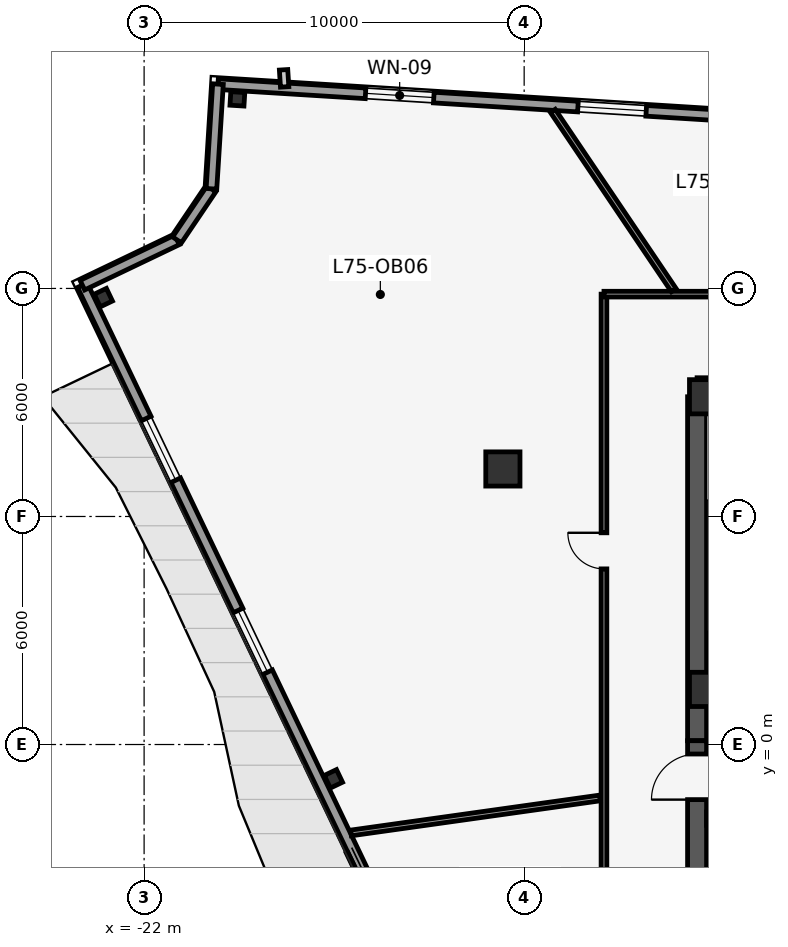
"""IFC4 building model, lengths in metres.
Left out: names, types, materials, properties, quantities, classifications, styles, units other than length and angle.
Written with IfcOpenShell. Run it as: python <this file> out.ifc"""

import sys

from ifc_helpers import new_model, si_unit, direction, frame, frame_2d, origin, origin_2d, place, context, subcontext, project, spatial, rectangle, i_section, extrude, element, fill, save


model = new_model("IFC4")
c1 = context("Model", 3, precision=1e-05, world=origin(), true_north=direction((0.0, 1.0)))
c2 = subcontext(c1, "Body", "Model", "MODEL_VIEW")
j1 = project(units=[si_unit("LENGTHUNIT", "METRE"), si_unit("PLANEANGLEUNIT", "RADIAN")], contexts=[c1])
p1 = place(None, origin())
s1 = spatial("IfcSite", under=j1, at=p1, CompositionType="ELEMENT")
p2 = place(p1, origin())
s2 = spatial("IfcBuilding", under=s1, at=p2, CompositionType="ELEMENT")
p3 = place(p2, frame((0.0, 0.0, 318.8)))
s3 = spatial("IfcBuildingStorey", under=s2, at=p3, CompositionType="ELEMENT", Elevation=318.8)
p4 = place(p3, frame((-7.45, 9.4, 0.0), z_axis=(0.0, 0.0, 1.0), x_axis=(1.0, 0.0, 0.0)))
e1 = element("IfcWall", 1, at=p4, inside=s3, PredefinedType="SHEAR", context=c2, shape_type="SweptSolid", body=[
    extrude(rectangle(XDim=14.9, YDim=0.5, at=frame_2d((7.45, 0.0))), origin(), (0.0, 0.0, 1.0), 4.32),
])
p5 = place(p4, frame((6.9, 0.0, 0.0)))
e2 = element("IfcOpeningElement", 2, at=p5, cuts=e1, PredefinedType="OPENING", context=c2, shape_type="SweptSolid", body=[
    extrude(rectangle(XDim=1.1, YDim=2.15, at=frame_2d((0.55, 1.075))), frame((0.0, 0.26, 0.0), z_axis=(0.0, -1.0, 0.0), x_axis=(1.0, 0.0, 0.0)), (0.0, 0.0, 1.0), 0.52),
])
p6 = place(p4, frame((4.23, 0.0, 0.0)))
e3 = element("IfcOpeningElement", 3, at=p6, cuts=e1, PredefinedType="OPENING", context=c2, shape_type="SweptSolid", body=[
    extrude(rectangle(XDim=0.88, YDim=2.15, at=frame_2d((0.44, 1.075))), frame((0.0, 0.26, 0.0), z_axis=(0.0, -1.0, 0.0), x_axis=(1.0, 0.0, 0.0)), (0.0, 0.0, 1.0), 0.52),
])
p7 = place(p4, frame((9.79, 0.0, 0.0)))
e4 = element("IfcOpeningElement", 4, at=p7, cuts=e1, PredefinedType="OPENING", context=c2, shape_type="SweptSolid", body=[
    extrude(rectangle(XDim=0.88, YDim=2.15, at=frame_2d((0.44, 1.075))), frame((0.0, 0.26, 0.0), z_axis=(0.0, -1.0, 0.0), x_axis=(1.0, 0.0, 0.0)), (0.0, 0.0, 1.0), 0.52),
])
p8 = place(p3, frame((-7.2, 1.275, 0.0), z_axis=(0.0, 0.0, 1.0), x_axis=(1.0, 0.0, 0.0)))
e5 = element("IfcWall", 5, at=p8, inside=s3, PredefinedType="SHEAR", context=c2, shape_type="SweptSolid", body=[
    extrude(rectangle(XDim=14.4, YDim=0.35, at=frame_2d((7.2, 0.0))), origin(), (0.0, 0.0, 1.0), 4.32),
])
p9 = place(p8, frame((3.795, 0.0, 0.0)))
e6 = element("IfcOpeningElement", 6, at=p9, cuts=e5, PredefinedType="OPENING", context=c2, shape_type="SweptSolid", body=[
    extrude(rectangle(XDim=1.25, YDim=2.25, at=frame_2d((0.625, 1.125))), frame((0.0, 0.185, 0.0), z_axis=(0.0, -1.0, 0.0), x_axis=(1.0, 0.0, 0.0)), (0.0, 0.0, 1.0), 0.37),
])
p10 = place(p8, frame((9.355, 0.0, 0.0)))
e7 = element("IfcOpeningElement", 7, at=p10, cuts=e5, PredefinedType="OPENING", context=c2, shape_type="SweptSolid", body=[
    extrude(rectangle(XDim=1.25, YDim=2.25, at=frame_2d((0.625, 1.125))), frame((0.0, 0.185, 0.0), z_axis=(0.0, -1.0, 0.0), x_axis=(1.0, 0.0, 0.0)), (0.0, 0.0, 1.0), 0.37),
])
p11 = place(p8, frame((1.075, 0.0, 0.0)))
e8 = element("IfcOpeningElement", 8, at=p11, cuts=e5, PredefinedType="OPENING", context=c2, shape_type="SweptSolid", body=[
    extrude(rectangle(XDim=1.1, YDim=2.15, at=frame_2d((0.55, 1.075))), frame((0.0, 0.185, 0.0), z_axis=(0.0, -1.0, 0.0), x_axis=(1.0, 0.0, 0.0)), (0.0, 0.0, 1.0), 0.37),
])
p12 = place(p8, frame((12.225, 0.0, 0.0)))
e9 = element("IfcOpeningElement", 9, at=p12, cuts=e5, PredefinedType="OPENING", context=c2, shape_type="SweptSolid", body=[
    extrude(rectangle(XDim=1.1, YDim=2.15, at=frame_2d((0.55, 1.075))), frame((0.0, 0.185, 0.0), z_axis=(0.0, -1.0, 0.0), x_axis=(1.0, 0.0, 0.0)), (0.0, 0.0, 1.0), 0.37),
])
p13 = place(p3, frame((-7.45, 0.1, 0.0), z_axis=(0.0, 0.0, 1.0), x_axis=(0.0, 1.0, 0.0)))
e10 = element("IfcWall", 10, at=p13, inside=s3, PredefinedType="SHEAR", context=c2, shape_type="SweptSolid", body=[
    extrude(rectangle(XDim=9.05, YDim=0.5, at=frame_2d((4.525, 0.0))), origin(), (0.0, 0.0, 1.0), 4.32),
])
p14 = place(p3, frame((-7.45, -9.0, 0.0), z_axis=(0.0, 0.0, 1.0), x_axis=(0.0, 1.0, 0.0)))
e11 = element("IfcWall", 11, at=p14, inside=s3, PredefinedType="SHEAR", context=c2, shape_type="SweptSolid", body=[
    extrude(rectangle(XDim=9.1, YDim=0.5, at=frame_2d((4.55, 0.0))), origin(), (0.0, 0.0, 1.0), 4.32),
])
p15 = place(p14, frame((2.64, 0.0, 0.0)))
e12 = element("IfcOpeningElement", 12, at=p15, cuts=e11, PredefinedType="OPENING", context=c2, shape_type="SweptSolid", body=[
    extrude(rectangle(XDim=1.8, YDim=2.2, at=frame_2d((0.9, 1.1))), frame((0.0, 0.26, 0.0), z_axis=(0.0, -1.0, 0.0), x_axis=(1.0, 0.0, 0.0)), (0.0, 0.0, 1.0), 0.52),
])
p16 = place(p14, frame((7.55, 0.0, 0.0)))
e13 = element("IfcOpeningElement", 13, at=p16, cuts=e11, PredefinedType="OPENING", context=c2, shape_type="SweptSolid", body=[
    extrude(rectangle(XDim=1.2, YDim=2.15, at=frame_2d((0.6, 1.075))), frame((0.0, 0.26, 0.0), z_axis=(0.0, -1.0, 0.0), x_axis=(1.0, 0.0, 0.0)), (0.0, 0.0, 1.0), 0.52),
])
p17 = place(p3, frame((-7.2, -1.95, 0.0), z_axis=(0.0, 0.0, 1.0), x_axis=(1.0, 0.0, 0.0)))
e14 = element("IfcWall", 14, at=p17, inside=s3, PredefinedType="SHEAR", context=c2, shape_type="SweptSolid", body=[
    extrude(rectangle(XDim=14.4, YDim=0.35, at=frame_2d((7.2, 0.0))), origin(), (0.0, 0.0, 1.0), 4.32),
])
for number, where, z_axis, x_axis in (
    (15, (-7.2, 9.15, 0.0), (0.0, 0.0, 1.0), (1.0, 0.0, 0.0)),
    (16, (-7.2, 1.45, 0.0), (0.0, 0.0, 1.0), (1.0, 0.0, 0.0)),
    (17, (-12.56, 7.25, 0.0), (0.0, 0.0, 1.0), (1.0, 0.0, 0.0)),
):
    element("IfcColumn", number, at=place(p3, frame(where, z_axis=z_axis, x_axis=x_axis)), inside=s3, PredefinedType="COLUMN", context=c2, shape_type="SweptSolid", body=[
        extrude(rectangle(XDim=0.9, YDim=0.9, at=origin_2d()), origin(), (0.0, 0.0, 1.0), 4.6),
    ])
for number, where, z_axis, x_axis in (
    (18, (-23.073, 11.759, 0.0), (0.0, 0.0, 1.0), (-0.431, 0.902, 0.0)),
    (19, (-17.019, -0.903, 0.0), (0.0, 0.0, 1.0), (-0.431, 0.902, 0.0)),
    (20, (-19.546, 16.988, 0.0), (0.0, 0.0, 1.0), (-0.998, 0.062, 0.0)),
):
    element("IfcColumn", number, at=place(p3, frame(where, z_axis=z_axis, x_axis=x_axis)), inside=s3, PredefinedType="COLUMN", context=c2, shape_type="SweptSolid", body=[
        extrude(i_section(OverallWidth=0.368, OverallDepth=0.356, WebThickness=0.011, FlangeThickness=0.018, at=origin_2d()), origin(), (0.0, 0.0, 1.0), 4.6),
    ])
p18 = place(p3, frame((-20.056, 17.376, 0.0), z_axis=(0.0, 0.0, 1.0), x_axis=(0.998061236898, -0.06223959674, 0.0)))
e21 = element("IfcWall", 21, at=p18, inside=s3, PredefinedType="STANDARD", context=c2, shape_type="SweptSolid", body=[
    extrude(rectangle(XDim=43.18, YDim=0.28, at=frame_2d((21.59, 0.0))), origin(), (0.0, 0.0, 1.0), 4.32),
])
p19 = place(p18, frame((3.89, 0.0, 0.85)))
e22 = element("IfcOpeningElement", 22, at=p19, cuts=e21, PredefinedType="OPENING", context=c2, shape_type="SweptSolid", body=[
    extrude(rectangle(XDim=1.8, YDim=2.4, at=frame_2d((0.9, 1.2))), frame((0.0, 0.15, 0.0), z_axis=(0.0, -1.0, 0.0), x_axis=(1.0, 0.0, 0.0)), (0.0, 0.0, 1.0), 0.3),
])
p20 = place(p18, frame((9.49, 0.0, 0.85)))
e23 = element("IfcOpeningElement", 23, at=p20, cuts=e21, PredefinedType="OPENING", context=c2, shape_type="SweptSolid", body=[
    extrude(rectangle(XDim=1.8, YDim=2.4, at=frame_2d((0.9, 1.2))), frame((0.0, 0.15, 0.0), z_axis=(0.0, -1.0, 0.0), x_axis=(1.0, 0.0, 0.0)), (0.0, 0.0, 1.0), 0.3),
])
p21 = place(p18, frame((31.89, 0.0, 0.85)))
e24 = element("IfcOpeningElement", 24, at=p21, cuts=e21, PredefinedType="OPENING", context=c2, shape_type="SweptSolid", body=[
    extrude(rectangle(XDim=1.8, YDim=2.4, at=frame_2d((0.9, 1.2))), frame((0.0, 0.15, 0.0), z_axis=(0.0, -1.0, 0.0), x_axis=(1.0, 0.0, 0.0)), (0.0, 0.0, 1.0), 0.3),
])
p22 = place(p18, frame((37.49, 0.0, 0.85)))
e25 = element("IfcOpeningElement", 25, at=p22, cuts=e21, PredefinedType="OPENING", context=c2, shape_type="SweptSolid", body=[
    extrude(rectangle(XDim=1.8, YDim=2.4, at=frame_2d((0.9, 1.2))), frame((0.0, 0.15, 0.0), z_axis=(0.0, -1.0, 0.0), x_axis=(1.0, 0.0, 0.0)), (0.0, 0.0, 1.0), 0.3),
])
p23 = place(p3, frame((-4.988, -26.865, 0.0), z_axis=(0.0, 0.0, 1.0), x_axis=(-0.431592936847, 0.902068476815, 0.0)))
e26 = element("IfcWall", 26, at=p23, inside=s3, PredefinedType="STANDARD", context=c2, shape_type="SweptSolid", body=[
    extrude(rectangle(XDim=43.18, YDim=0.28, at=frame_2d((21.59, 0.0))), origin(), (0.0, 0.0, 1.0), 4.32),
])
p24 = place(p23, frame((18.499, 0.0, 0.0)))
e27 = element("IfcOpeningElement", 27, at=p24, cuts=e26, PredefinedType="OPENING", context=c2, shape_type="SweptSolid", body=[
    extrude(rectangle(XDim=1.0, YDim=2.15, at=frame_2d((0.5, 1.075))), frame((0.0, 0.15, 0.0), z_axis=(0.0, -1.0, 0.0), x_axis=(1.0, 0.0, 0.0)), (0.0, 0.0, 1.0), 0.3),
])
p25 = place(p23, frame((9.49, 0.0, 0.85)))
e28 = element("IfcOpeningElement", 28, at=p25, cuts=e26, PredefinedType="OPENING", context=c2, shape_type="SweptSolid", body=[
    extrude(rectangle(XDim=1.8, YDim=2.4, at=frame_2d((0.9, 1.2))), frame((0.0, 0.15, 0.0), z_axis=(0.0, -1.0, 0.0), x_axis=(1.0, 0.0, 0.0)), (0.0, 0.0, 1.0), 0.3),
])
p26 = place(p23, frame((31.89, 0.0, 0.85)))
e29 = element("IfcOpeningElement", 29, at=p26, cuts=e26, PredefinedType="OPENING", context=c2, shape_type="SweptSolid", body=[
    extrude(rectangle(XDim=1.8, YDim=2.4, at=frame_2d((0.9, 1.2))), frame((0.0, 0.15, 0.0), z_axis=(0.0, -1.0, 0.0), x_axis=(1.0, 0.0, 0.0)), (0.0, 0.0, 1.0), 0.3),
])
p27 = place(p23, frame((37.49, 0.0, 0.85)))
e30 = element("IfcOpeningElement", 30, at=p27, cuts=e26, PredefinedType="OPENING", context=c2, shape_type="SweptSolid", body=[
    extrude(rectangle(XDim=1.8, YDim=2.4, at=frame_2d((0.9, 1.2))), frame((0.0, 0.15, 0.0), z_axis=(0.0, -1.0, 0.0), x_axis=(1.0, 0.0, 0.0)), (0.0, 0.0, 1.0), 0.3),
])
p28 = place(p3, frame((-23.625, 12.087, 0.0), z_axis=(0.0, 0.0, 1.0), x_axis=(0.902092306117, 0.431543127909, 0.0)))
e31 = element("IfcWall", 31, at=p28, inside=s3, PredefinedType="STANDARD", context=c2, shape_type="SweptSolid", body=[
    extrude(rectangle(XDim=2.76, YDim=0.28, at=frame_2d((1.38, 0.0))), origin(), (0.0, 0.0, 1.0), 4.32),
])
p29 = place(p3, frame((-21.135, 13.278, 0.0), z_axis=(0.0, 0.0, 1.0), x_axis=(0.559107950815, 0.829094867512, 0.0)))
e32 = element("IfcWall", 32, at=p29, inside=s3, PredefinedType="STANDARD", context=c2, shape_type="SweptSolid", body=[
    extrude(rectangle(XDim=1.62, YDim=0.28, at=frame_2d((0.81, 0.0))), origin(), (0.0, 0.0, 1.0), 4.32),
])
p30 = place(p3, frame((-20.229, 14.622, 0.0), z_axis=(0.0, 0.0, 1.0), x_axis=(0.062361765106, 0.998053610911, 0.0)))
e33 = element("IfcWall", 33, at=p30, inside=s3, PredefinedType="STANDARD", context=c2, shape_type="SweptSolid", body=[
    extrude(rectangle(XDim=2.76, YDim=0.28, at=frame_2d((1.38, 0.0))), origin(), (0.0, 0.0, 1.0), 4.32),
])
p31 = place(p3, frame((-9.9, -9.937, 0.0), z_axis=(0.0, 0.0, 1.0), x_axis=(0.0, 1.0, 0.0)))
e34 = element("IfcWall", 34, at=p31, inside=s3, PredefinedType="PARTITIONING", context=c2, shape_type="SweptSolid", body=[
    extrude(rectangle(XDim=21.787, YDim=0.15, at=frame_2d((10.894, 0.0))), origin(), (0.0, 0.0, 1.0), 4.32),
])
p32 = place(p31, frame((3.919, 0.0, 0.0)))
e35 = element("IfcOpeningElement", 35, at=p32, cuts=e34, PredefinedType="OPENING", context=c2, shape_type="SweptSolid", body=[
    extrude(rectangle(XDim=0.95, YDim=2.15, at=frame_2d((0.475, 1.075))), frame((0.0, 0.085, 0.0), z_axis=(0.0, -1.0, 0.0), x_axis=(1.0, 0.0, 0.0)), (0.0, 0.0, 1.0), 0.17),
])
p33 = place(p31, frame((14.558, 0.0, 0.0)))
e36 = element("IfcOpeningElement", 36, at=p33, cuts=e34, PredefinedType="OPENING", context=c2, shape_type="SweptSolid", body=[
    extrude(rectangle(XDim=0.95, YDim=2.15, at=frame_2d((0.475, 1.075))), frame((0.0, 0.085, 0.0), z_axis=(0.0, -1.0, 0.0), x_axis=(1.0, 0.0, 0.0)), (0.0, 0.0, 1.0), 0.17),
])
p34 = place(p3, frame((-9.9, 11.85, 0.0), z_axis=(0.0, 0.0, 1.0), x_axis=(1.0, 0.0, 0.0)))
e37 = element("IfcWall", 37, at=p34, inside=s3, PredefinedType="PARTITIONING", context=c2, shape_type="SweptSolid", body=[
    extrude(rectangle(XDim=5.37, YDim=0.15, at=frame_2d((2.685, 0.0))), origin(), (0.0, 0.0, 1.0), 4.32),
])
p35 = place(p3, frame((-8.064, 11.955, 0.0), z_axis=(0.0, 0.0, 1.0), x_axis=(-0.559217811097, 0.829020771604, 0.0)))
e38 = element("IfcWall", 38, at=p35, inside=s3, PredefinedType="PARTITIONING", context=c2, shape_type="SweptSolid", body=[
    extrude(rectangle(XDim=5.689, YDim=0.15, at=frame_2d((2.844, 0.0))), origin(), (0.0, 0.0, 1.0), 4.32),
])
p36 = place(p3, frame((-10.005, -1.406, 0.0), z_axis=(0.0, 0.0, 1.0), x_axis=(-0.99026508468, -0.139194332007, 0.0)))
e39 = element("IfcWall", 39, at=p36, inside=s3, PredefinedType="PARTITIONING", context=c2, shape_type="SweptSolid", body=[
    extrude(rectangle(XDim=6.616, YDim=0.15, at=frame_2d((3.308, 0.0))), origin(), (0.0, 0.0, 1.0), 4.32),
])
p37 = place(p19, origin())
e40 = element("IfcWindow", 40, at=p37, inside=s3, PartitioningType="DOUBLE_PANEL_VERTICAL", PredefinedType="WINDOW", context=c2, shape_type="SweptSolid", body=[
    extrude(rectangle(XDim=1.8, YDim=2.4, at=frame_2d((0.9, 1.2))), frame((0.0, 0.03, 0.0), z_axis=(0.0, -1.0, 0.0), x_axis=(1.0, 0.0, 0.0)), (0.0, 0.0, 1.0), 0.06),
])
fill(e22, e40)
p38 = place(p20, origin())
e41 = element("IfcWindow", 41, at=p38, inside=s3, PartitioningType="DOUBLE_PANEL_VERTICAL", PredefinedType="WINDOW", context=c2, shape_type="SweptSolid", body=[
    extrude(rectangle(XDim=1.8, YDim=2.4, at=frame_2d((0.9, 1.2))), frame((0.0, 0.03, 0.0), z_axis=(0.0, -1.0, 0.0), x_axis=(1.0, 0.0, 0.0)), (0.0, 0.0, 1.0), 0.06),
])
fill(e23, e41)
p39 = place(p26, origin())
e42 = element("IfcWindow", 42, at=p39, inside=s3, PartitioningType="DOUBLE_PANEL_VERTICAL", PredefinedType="WINDOW", context=c2, shape_type="SweptSolid", body=[
    extrude(rectangle(XDim=1.8, YDim=2.4, at=frame_2d((0.9, 1.2))), frame((0.0, 0.03, 0.0), z_axis=(0.0, -1.0, 0.0), x_axis=(1.0, 0.0, 0.0)), (0.0, 0.0, 1.0), 0.06),
])
fill(e29, e42)
p40 = place(p27, origin())
e43 = element("IfcWindow", 43, at=p40, inside=s3, PartitioningType="DOUBLE_PANEL_VERTICAL", PredefinedType="WINDOW", context=c2, shape_type="SweptSolid", body=[
    extrude(rectangle(XDim=1.8, YDim=2.4, at=frame_2d((0.9, 1.2))), frame((0.0, 0.03, 0.0), z_axis=(0.0, -1.0, 0.0), x_axis=(1.0, 0.0, 0.0)), (0.0, 0.0, 1.0), 0.06),
])
fill(e30, e43)
p41 = place(p16, origin())
e44 = element("IfcDoor", 44, at=p41, inside=s3, OperationType="SINGLE_SWING_LEFT", PredefinedType="DOOR", context=c2, shape_type="SweptSolid", body=[
    extrude(rectangle(XDim=1.2, YDim=2.15, at=frame_2d((0.6, 1.075))), frame((0.0, 0.025, 0.0), z_axis=(0.0, -1.0, 0.0), x_axis=(1.0, 0.0, 0.0)), (0.0, 0.0, 1.0), 0.05),
])
fill(e13, e44)
p42 = place(p33, origin())
e45 = element("IfcDoor", 45, at=p42, inside=s3, OperationType="SINGLE_SWING_RIGHT", PredefinedType="DOOR", context=c2, shape_type="SweptSolid", body=[
    extrude(rectangle(XDim=0.95, YDim=2.15, at=frame_2d((0.475, 1.075))), frame((0.0, 0.025, 0.0), z_axis=(0.0, -1.0, 0.0), x_axis=(1.0, 0.0, 0.0)), (0.0, 0.0, 1.0), 0.05),
])
fill(e36, e45)
save(model, sys.argv[1])
